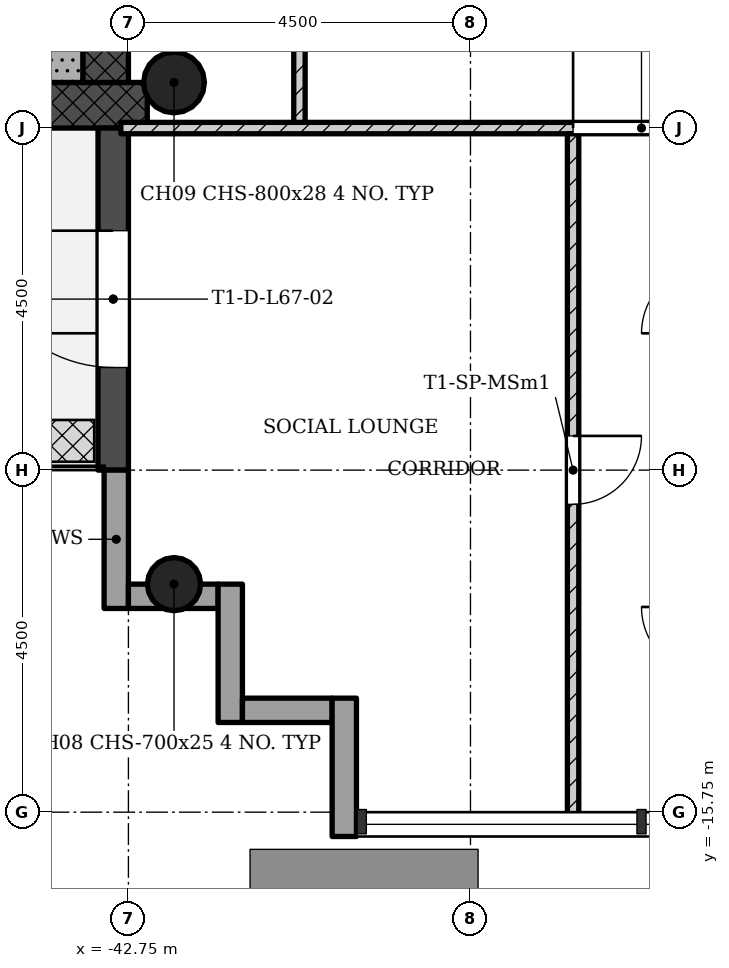
"""IFC4 building model, lengths in metres.
Left out: names, types, materials, properties, quantities, classifications, styles, units other than length and angle.
Written with IfcOpenShell. Run it as: python <this file> out.ifc"""

import sys

from ifc_helpers import new_model, si_unit, direction, frame, frame_2d, origin, origin_2d, place, context, subcontext, project, spatial, rectangle, hollow_circle, extrude, element, fill, save


model = new_model("IFC4")
c1 = context("Model", 3, precision=1e-05, world=origin(), true_north=direction((0.0, 1.0)))
c2 = subcontext(c1, "Body", "Model", "MODEL_VIEW")
j1 = project(units=[si_unit("LENGTHUNIT", "METRE"), si_unit("PLANEANGLEUNIT", "RADIAN")], contexts=[c1])
p1 = place(None, origin())
s1 = spatial("IfcSite", under=j1, at=p1, CompositionType="ELEMENT")
p2 = place(p1, origin())
s2 = spatial("IfcBuilding", under=s1, at=p2, CompositionType="ELEMENT")
p3 = place(p2, frame((0.0, 0.0, 242.4)))
s3 = spatial("IfcBuildingStorey", under=s2, at=p3, CompositionType="ELEMENT", Elevation=242.4)
p4 = place(p3, frame((-51.15, -6.45, 0.0), z_axis=(0.0, 0.0, 1.0), x_axis=(1.0, 0.0, 0.0)))
e1 = element("IfcWall", 1, at=p4, inside=s3, PredefinedType="SHEAR", context=c2, shape_type="SweptSolid", body=[
    extrude(rectangle(XDim=8.648, YDim=0.6, at=frame_2d((4.324, 0.0))), origin(), (0.0, 0.0, 1.0), 4.5),
])
p5 = place(p3, frame((-43.05, -6.15, 0.0), z_axis=(0.0, 0.0, 1.0), x_axis=(0.0, 1.0, 0.0)))
e2 = element("IfcWall", 2, at=p5, inside=s3, PredefinedType="SHEAR", context=c2, shape_type="SweptSolid", body=[
    extrude(rectangle(XDim=12.9, YDim=0.6, at=frame_2d((6.45, 0.0))), origin(), (0.0, 0.0, 1.0), 4.5),
])
p6 = place(p5, frame((5.25, 0.0, 0.0)))
e3 = element("IfcOpeningElement", 3, at=p6, cuts=e2, PredefinedType="OPENING", context=c2, shape_type="SweptSolid", body=[
    extrude(rectangle(XDim=1.8, YDim=2.1, at=frame_2d((0.9, 1.05))), frame((0.0, 0.31, 0.0), z_axis=(0.0, -1.0, 0.0), x_axis=(1.0, 0.0, 0.0)), (0.0, 0.0, 1.0), 0.62),
])
p7 = place(p3, frame((-42.15, -12.75, 0.0), z_axis=(0.0, 0.0, 1.0), x_axis=(1.0, 0.0, 0.0)))
e4 = element("IfcColumn", 4, at=p7, inside=s3, PredefinedType="COLUMN", context=c2, shape_type="SweptSolid", body=[
    extrude(hollow_circle(Radius=0.35, WallThickness=0.025, at=origin_2d()), origin(), (0.0, 0.0, 1.0), 4.5),
])
p8 = place(p3, frame((-42.15, -6.15, 0.0), z_axis=(0.0, 0.0, 1.0), x_axis=(1.0, 0.0, 0.0)))
e5 = element("IfcColumn", 5, at=p8, inside=s3, PredefinedType="COLUMN", context=c2, shape_type="SweptSolid", body=[
    extrude(hollow_circle(Radius=0.4, WallThickness=0.028, at=origin_2d()), origin(), (0.0, 0.0, 1.0), 4.5),
])
p9 = place(p3, frame((-42.95, -6.75, -0.02), z_axis=(0.0, 0.0, 1.0), x_axis=(0.0, -1.0, 0.0)))
e6 = element("IfcWall", 6, at=p9, inside=s3, PredefinedType="STANDARD", context=c2, shape_type="SweptSolid", body=[
    extrude(rectangle(XDim=4.5, YDim=0.4, at=frame_2d((2.25, 0.0))), origin(), (0.0, 0.0, 1.0), 4.22),
])
p10 = place(p9, frame((1.35, 0.0, 0.02)))
e7 = element("IfcOpeningElement", 7, at=p10, cuts=e6, PredefinedType="OPENING", context=c2, shape_type="SweptSolid", body=[
    extrude(rectangle(XDim=1.8, YDim=2.1, at=frame_2d((0.9, 1.05))), frame((0.0, 0.21, 0.0), z_axis=(0.0, -1.0, 0.0), x_axis=(1.0, 0.0, 0.0)), (0.0, 0.0, 1.0), 0.42),
])
p11 = place(p3, frame((-42.91, -11.25, -0.3), z_axis=(0.0, 0.0, 1.0), x_axis=(0.0, -1.0, 0.0)))
e8 = element("IfcWall", 8, at=p11, inside=s3, PredefinedType="STANDARD", context=c2, shape_type="SweptSolid", body=[
    extrude(rectangle(XDim=1.82, YDim=0.32, at=frame_2d((0.91, 0.0))), origin(), (0.0, 0.0, 1.0), 4.5),
])
p12 = place(p3, frame((-42.75, -12.91, -0.3), z_axis=(0.0, 0.0, 1.0), x_axis=(1.0, 0.0, 0.0)))
e9 = element("IfcWall", 9, at=p12, inside=s3, PredefinedType="STANDARD", context=c2, shape_type="SweptSolid", body=[
    extrude(rectangle(XDim=1.18, YDim=0.32, at=frame_2d((0.59, 0.0))), origin(), (0.0, 0.0, 1.0), 4.5),
])
p13 = place(p3, frame((-41.41, -12.75, -0.3), z_axis=(0.0, 0.0, 1.0), x_axis=(0.0, -1.0, 0.0)))
e10 = element("IfcWall", 10, at=p13, inside=s3, PredefinedType="STANDARD", context=c2, shape_type="SweptSolid", body=[
    extrude(rectangle(XDim=1.82, YDim=0.32, at=frame_2d((0.91, 0.0))), origin(), (0.0, 0.0, 1.0), 4.5),
])
p14 = place(p3, frame((-41.25, -14.41, -0.3), z_axis=(0.0, 0.0, 1.0), x_axis=(1.0, 0.0, 0.0)))
e11 = element("IfcWall", 11, at=p14, inside=s3, PredefinedType="STANDARD", context=c2, shape_type="SweptSolid", body=[
    extrude(rectangle(XDim=1.18, YDim=0.32, at=frame_2d((0.59, 0.0))), origin(), (0.0, 0.0, 1.0), 4.5),
])
p15 = place(p3, frame((-39.91, -14.25, -0.3), z_axis=(0.0, 0.0, 1.0), x_axis=(0.0, -1.0, 0.0)))
e12 = element("IfcWall", 12, at=p15, inside=s3, PredefinedType="STANDARD", context=c2, shape_type="SweptSolid", body=[
    extrude(rectangle(XDim=1.82, YDim=0.32, at=frame_2d((0.91, 0.0))), origin(), (0.0, 0.0, 1.0), 4.5),
])
p16 = place(p3, frame((-40.5, -6.75, 0.0), z_axis=(0.0, 0.0, 1.0), x_axis=(0.0, 1.0, 0.0)))
e13 = element("IfcWall", 13, at=p16, inside=s3, PredefinedType="PARTITIONING", context=c2, shape_type="SweptSolid", body=[
    extrude(rectangle(XDim=4.5, YDim=0.15, at=frame_2d((2.25, 0.0))), origin(), (0.0, 0.0, 1.0), 4.08),
])
p17 = place(p16, frame((1.8, 0.0, 0.0)))
e14 = element("IfcOpeningElement", 14, at=p17, cuts=e13, PredefinedType="OPENING", context=c2, shape_type="SweptSolid", body=[
    extrude(rectangle(XDim=0.9, YDim=2.1, at=frame_2d((0.45, 1.05))), frame((0.0, 0.085, 0.0), z_axis=(0.0, -1.0, 0.0), x_axis=(1.0, 0.0, 0.0)), (0.0, 0.0, 1.0), 0.17),
])
p18 = place(p3, frame((-42.85, -6.75, 0.0), z_axis=(0.0, 0.0, 1.0), x_axis=(1.0, 0.0, 0.0)))
e15 = element("IfcWall", 15, at=p18, inside=s3, PredefinedType="PARTITIONING", context=c2, shape_type="SweptSolid", body=[
    extrude(rectangle(XDim=13.7, YDim=0.15, at=frame_2d((6.85, 0.0))), origin(), (0.0, 0.0, 1.0), 4.08),
])
p19 = place(p18, frame((5.95, 0.0, 0.0)))
e16 = element("IfcOpeningElement", 16, at=p19, cuts=e15, PredefinedType="OPENING", context=c2, shape_type="SweptSolid", body=[
    extrude(rectangle(XDim=1.8, YDim=2.1, at=frame_2d((0.9, 1.05))), frame((0.0, 0.085, 0.0), z_axis=(0.0, -1.0, 0.0), x_axis=(1.0, 0.0, 0.0)), (0.0, 0.0, 1.0), 0.17),
])
p20 = place(p3, frame((-36.9, -15.85, 0.0), z_axis=(0.0, 0.0, 1.0), x_axis=(0.0, 1.0, 0.0)))
e17 = element("IfcWall", 17, at=p20, inside=s3, PredefinedType="PARTITIONING", context=c2, shape_type="SweptSolid", body=[
    extrude(rectangle(XDim=9.025, YDim=0.15, at=frame_2d((4.513, 0.0))), origin(), (0.0, 0.0, 1.0), 4.08),
])
p21 = place(p20, frame((4.15, 0.0, 0.0)))
e18 = element("IfcOpeningElement", 18, at=p21, cuts=e17, PredefinedType="OPENING", context=c2, shape_type="SweptSolid", body=[
    extrude(rectangle(XDim=0.9, YDim=2.1, at=frame_2d((0.45, 1.05))), frame((0.0, 0.085, 0.0), z_axis=(0.0, -1.0, 0.0), x_axis=(1.0, 0.0, 0.0)), (0.0, 0.0, 1.0), 0.17),
])
p22 = place(p3, frame((-43.65, -1.85, 0.0), z_axis=(0.0, 0.0, 1.0), x_axis=(0.0, -1.0, 0.0)))
e19 = element("IfcWall", 19, at=p22, inside=s3, PredefinedType="SHEAR", context=c2, shape_type="SweptSolid", body=[
    extrude(rectangle(XDim=4.3, YDim=0.6, at=frame_2d((2.15, 0.0))), origin(), (0.0, 0.0, 1.0), 4.5),
])
p23 = place(p10, origin())
e20 = element("IfcDoor", 20, at=p23, inside=s3, OperationType="SINGLE_SWING_LEFT", PredefinedType="DOOR", context=c2, shape_type="SweptSolid", body=[
    extrude(rectangle(XDim=1.8, YDim=2.1, at=frame_2d((0.9, 1.05))), frame((0.0, 0.025, 0.0), z_axis=(0.0, -1.0, 0.0), x_axis=(1.0, 0.0, 0.0)), (0.0, 0.0, 1.0), 0.05),
])
fill(e7, e20)
p24 = place(p19, origin())
e21 = element("IfcDoor", 21, at=p24, inside=s3, OperationType="SINGLE_SWING_RIGHT", PredefinedType="DOOR", context=c2, shape_type="SweptSolid", body=[
    extrude(rectangle(XDim=1.8, YDim=2.1, at=frame_2d((0.9, 1.05))), frame((0.0, 0.025, 0.0), z_axis=(0.0, -1.0, 0.0), x_axis=(1.0, 0.0, 0.0)), (0.0, 0.0, 1.0), 0.05),
])
fill(e16, e21)
p25 = place(p21, origin())
e22 = element("IfcDoor", 22, at=p25, inside=s3, OperationType="SINGLE_SWING_RIGHT", PredefinedType="DOOR", context=c2, shape_type="SweptSolid", body=[
    extrude(rectangle(XDim=0.9, YDim=2.1, at=frame_2d((0.45, 1.05))), frame((0.0, 0.025, 0.0), z_axis=(0.0, -1.0, 0.0), x_axis=(1.0, 0.0, 0.0)), (0.0, 0.0, 1.0), 0.05),
])
fill(e18, e22)
save(model, sys.argv[1])
